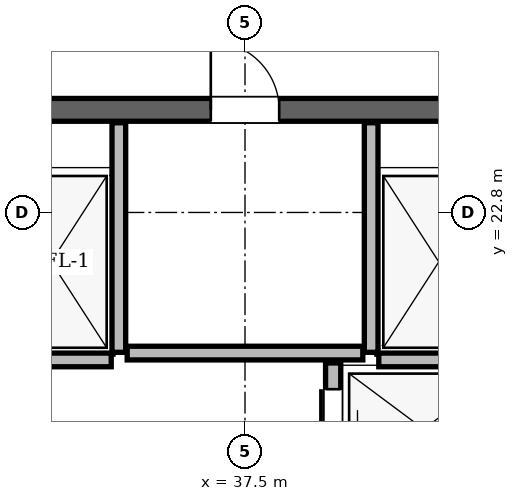
"""IFC4 building model, lengths in metres.
Left out: names, types, materials, properties, quantities, classifications, styles, units other than length and angle.
Written with IfcOpenShell. Run it as: python <this file> out.ifc"""

import sys

from ifc_helpers import new_model, si_unit, direction, frame, frame_2d, origin, place, context, subcontext, project, spatial, rectangle, extrude, element, fill, save


model = new_model("IFC4")
c1 = context("Model", 3, precision=1e-05, world=origin(), true_north=direction((0.0, 1.0)))
c2 = subcontext(c1, "Body", "Model", "MODEL_VIEW")
j1 = project(units=[si_unit("LENGTHUNIT", "METRE"), si_unit("PLANEANGLEUNIT", "RADIAN")], contexts=[c1])
p1 = place(None, origin())
s1 = spatial("IfcSite", under=j1, at=p1, CompositionType="ELEMENT")
p2 = place(p1, origin())
s2 = spatial("IfcBuilding", under=s1, at=p2, CompositionType="ELEMENT")
p3 = place(p2, frame((0.0, 0.0, 269.4)))
s3 = spatial("IfcBuildingStorey", under=s2, at=p3, CompositionType="ELEMENT", Elevation=269.4)
p4 = place(p3, frame((29.65, 24.15, 0.0), z_axis=(0.0, 0.0, 1.0), x_axis=(1.0, 0.0, 0.0)))
e1 = element("IfcWall", 1, at=p4, inside=s3, PredefinedType="SHEAR", context=c2, shape_type="SweptSolid", body=[
    extrude(rectangle(XDim=15.7, YDim=0.3, at=frame_2d((7.85, 0.0))), origin(), (0.0, 0.0, 1.0), 3.68),
])
p5 = place(p4, frame((1.7, 0.0, 0.0)))
e2 = element("IfcOpeningElement", 2, at=p5, cuts=e1, PredefinedType="OPENING", context=c2, shape_type="SweptSolid", body=[
    extrude(rectangle(XDim=1.2, YDim=2.2, at=frame_2d((0.6, 1.1))), frame((0.0, 0.15, 0.0), z_axis=(0.0, -1.0, 0.0), x_axis=(1.0, 0.0, 0.0)), (0.0, 0.0, 1.0), 0.3),
])
p6 = place(p4, frame((12.8, 0.0, 0.0)))
e3 = element("IfcOpeningElement", 3, at=p6, cuts=e1, PredefinedType="OPENING", context=c2, shape_type="SweptSolid", body=[
    extrude(rectangle(XDim=1.2, YDim=2.2, at=frame_2d((0.6, 1.1))), frame((0.0, 0.15, 0.0), z_axis=(0.0, -1.0, 0.0), x_axis=(1.0, 0.0, 0.0)), (0.0, 0.0, 1.0), 0.3),
])
p7 = place(p4, frame((7.4, 0.0, 0.0)))
e4 = element("IfcOpeningElement", 4, at=p7, cuts=e1, PredefinedType="OPENING", context=c2, shape_type="SweptSolid", body=[
    extrude(rectangle(XDim=0.9, YDim=2.05, at=frame_2d((0.45, 1.025))), frame((0.0, 0.15, 0.0), z_axis=(0.0, -1.0, 0.0), x_axis=(1.0, 0.0, 0.0)), (0.0, 0.0, 1.0), 0.3),
])
p8 = place(p3, frame((58.572, 10.733, 0.0), z_axis=(0.0, 0.0, 1.0), x_axis=(-0.500001430823, 0.866024577697, 0.0)))
e5 = element("IfcWall", 5, at=p8, inside=s3, PredefinedType="SOLIDWALL", context=c2, shape_type="SweptSolid", body=[
    extrude(rectangle(XDim=37.296, YDim=0.29, at=frame_2d((18.648, 0.0))), origin(), (0.0, 0.0, 1.0), 3.058),
])
p9 = place(p8, frame((8.454, 0.0, 0.0)))
e6 = element("IfcOpeningElement", 6, at=p9, cuts=e5, PredefinedType="OPENING", context=c2, shape_type="SweptSolid", body=[
    extrude(rectangle(XDim=1.5, YDim=2.2, at=frame_2d((0.75, 1.1))), frame((0.0, 0.145, 0.0), z_axis=(0.0, -1.0, 0.0), x_axis=(1.0, 0.0, 0.0)), (0.0, 0.0, 1.0), 0.29),
])
p10 = place(p8, frame((28.796, 0.0, 0.0)))
e7 = element("IfcOpeningElement", 7, at=p10, cuts=e5, PredefinedType="OPENING", context=c2, shape_type="SweptSolid", body=[
    extrude(rectangle(XDim=1.5, YDim=2.2, at=frame_2d((0.75, 1.1))), frame((0.0, 0.145, 0.0), z_axis=(0.0, -1.0, 0.0), x_axis=(1.0, 0.0, 0.0)), (0.0, 0.0, 1.0), 0.29),
])
p11 = place(p8, frame((0.77, 0.0, 0.85)))
e8 = element("IfcOpeningElement", 8, at=p11, cuts=e5, PredefinedType="OPENING", context=c2, shape_type="SweptSolid", body=[
    extrude(rectangle(XDim=1.2, YDim=1.48, at=frame_2d((0.6, 0.74))), frame((0.0, 0.145, 0.0), z_axis=(0.0, -1.0, 0.0), x_axis=(1.0, 0.0, 0.0)), (0.0, 0.0, 1.0), 0.29),
])
p12 = place(p8, frame((2.285, 0.0, 0.85)))
e9 = element("IfcOpeningElement", 9, at=p12, cuts=e5, PredefinedType="OPENING", context=c2, shape_type="SweptSolid", body=[
    extrude(rectangle(XDim=1.2, YDim=1.48, at=frame_2d((0.6, 0.74))), frame((0.0, 0.145, 0.0), z_axis=(0.0, -1.0, 0.0), x_axis=(1.0, 0.0, 0.0)), (0.0, 0.0, 1.0), 0.29),
])
p13 = place(p8, frame((6.772, 0.0, 0.85)))
e10 = element("IfcOpeningElement", 10, at=p13, cuts=e5, PredefinedType="OPENING", context=c2, shape_type="SweptSolid", body=[
    extrude(rectangle(XDim=1.2, YDim=1.48, at=frame_2d((0.6, 0.74))), frame((0.0, 0.145, 0.0), z_axis=(0.0, -1.0, 0.0), x_axis=(1.0, 0.0, 0.0)), (0.0, 0.0, 1.0), 0.29),
])
p14 = place(p8, frame((12.682, 0.0, 0.85)))
e11 = element("IfcOpeningElement", 11, at=p14, cuts=e5, PredefinedType="OPENING", context=c2, shape_type="SweptSolid", body=[
    extrude(rectangle(XDim=3.0, YDim=2.098, at=frame_2d((1.5, 1.049))), frame((0.0, 0.145, 0.0), z_axis=(0.0, -1.0, 0.0), x_axis=(1.0, 0.0, 0.0)), (0.0, 0.0, 1.0), 0.29),
])
p15 = place(p8, frame((17.842, 0.0, 0.85)))
e12 = element("IfcOpeningElement", 12, at=p15, cuts=e5, PredefinedType="OPENING", context=c2, shape_type="SweptSolid", body=[
    extrude(rectangle(XDim=2.6, YDim=1.95, at=frame_2d((1.3, 0.975))), frame((0.0, 0.145, 0.0), z_axis=(0.0, -1.0, 0.0), x_axis=(1.0, 0.0, 0.0)), (0.0, 0.0, 1.0), 0.29),
])
p16 = place(p8, frame((35.217, 0.0, 0.85)))
e13 = element("IfcOpeningElement", 13, at=p16, cuts=e5, PredefinedType="OPENING", context=c2, shape_type="SweptSolid", body=[
    extrude(rectangle(XDim=1.2, YDim=1.48, at=frame_2d((0.6, 0.74))), frame((0.0, 0.145, 0.0), z_axis=(0.0, -1.0, 0.0), x_axis=(1.0, 0.0, 0.0)), (0.0, 0.0, 1.0), 0.29),
])
p17 = place(p8, frame((33.737, 0.0, 0.85)))
e14 = element("IfcOpeningElement", 14, at=p17, cuts=e5, PredefinedType="OPENING", context=c2, shape_type="SweptSolid", body=[
    extrude(rectangle(XDim=1.2, YDim=1.48, at=frame_2d((0.6, 0.74))), frame((0.0, 0.145, 0.0), z_axis=(0.0, -1.0, 0.0), x_axis=(1.0, 0.0, 0.0)), (0.0, 0.0, 1.0), 0.29),
])
p18 = place(p8, frame((22.775, 0.0, 0.85)))
e15 = element("IfcOpeningElement", 15, at=p18, cuts=e5, PredefinedType="OPENING", context=c2, shape_type="SweptSolid", body=[
    extrude(rectangle(XDim=1.2, YDim=1.48, at=frame_2d((0.6, 0.74))), frame((0.0, 0.145, 0.0), z_axis=(0.0, -1.0, 0.0), x_axis=(1.0, 0.0, 0.0)), (0.0, 0.0, 1.0), 0.29),
])
p19 = place(p8, frame((31.663, 0.0, 0.85)))
e16 = element("IfcOpeningElement", 16, at=p19, cuts=e5, PredefinedType="OPENING", context=c2, shape_type="SweptSolid", body=[
    extrude(rectangle(XDim=1.2, YDim=1.48, at=frame_2d((0.6, 0.74))), frame((0.0, 0.145, 0.0), z_axis=(0.0, -1.0, 0.0), x_axis=(1.0, 0.0, 0.0)), (0.0, 0.0, 1.0), 0.29),
])
p20 = place(p3, frame((35.076, 43.032, 0.0), z_axis=(0.0, 0.0, 1.0), x_axis=(-0.500001430823, -0.866024577697, 0.0)))
e17 = element("IfcWall", 17, at=p20, inside=s3, PredefinedType="SOLIDWALL", context=c2, shape_type="SweptSolid", body=[
    extrude(rectangle(XDim=37.296, YDim=0.29, at=frame_2d((18.648, 0.0))), origin(), (0.0, 0.0, 1.0), 3.058),
])
p21 = place(p20, frame((8.244, 0.0, 0.0)))
e18 = element("IfcOpeningElement", 18, at=p21, cuts=e17, PredefinedType="OPENING", context=c2, shape_type="SweptSolid", body=[
    extrude(rectangle(XDim=1.5, YDim=2.2, at=frame_2d((0.75, 1.1))), frame((0.0, 0.145, 0.0), z_axis=(0.0, -1.0, 0.0), x_axis=(1.0, 0.0, 0.0)), (0.0, 0.0, 1.0), 0.29),
])
p22 = place(p20, frame((29.006, 0.0, 0.0)))
e19 = element("IfcOpeningElement", 19, at=p22, cuts=e17, PredefinedType="OPENING", context=c2, shape_type="SweptSolid", body=[
    extrude(rectangle(XDim=1.5, YDim=2.2, at=frame_2d((0.75, 1.1))), frame((0.0, 0.145, 0.0), z_axis=(0.0, -1.0, 0.0), x_axis=(1.0, 0.0, 0.0)), (0.0, 0.0, 1.0), 0.29),
])
p23 = place(p20, frame((22.292, 0.0, 0.85)))
e20 = element("IfcOpeningElement", 20, at=p23, cuts=e17, PredefinedType="OPENING", context=c2, shape_type="SweptSolid", body=[
    extrude(rectangle(XDim=2.6, YDim=1.95, at=frame_2d((1.3, 0.975))), frame((0.0, 0.145, 0.0), z_axis=(0.0, -1.0, 0.0), x_axis=(1.0, 0.0, 0.0)), (0.0, 0.0, 1.0), 0.29),
])
p24 = place(p20, frame((33.833, 0.0, 0.85)))
e21 = element("IfcOpeningElement", 21, at=p24, cuts=e17, PredefinedType="OPENING", context=c2, shape_type="SweptSolid", body=[
    extrude(rectangle(XDim=2.4, YDim=1.9, at=frame_2d((1.2, 0.95))), frame((0.0, 0.145, 0.0), z_axis=(0.0, -1.0, 0.0), x_axis=(1.0, 0.0, 0.0)), (0.0, 0.0, 1.0), 0.29),
])
p25 = place(p20, frame((12.154, 0.0, 0.85)))
e22 = element("IfcOpeningElement", 22, at=p25, cuts=e17, PredefinedType="OPENING", context=c2, shape_type="SweptSolid", body=[
    extrude(rectangle(XDim=1.2, YDim=1.48, at=frame_2d((0.6, 0.74))), frame((0.0, 0.145, 0.0), z_axis=(0.0, -1.0, 0.0), x_axis=(1.0, 0.0, 0.0)), (0.0, 0.0, 1.0), 0.29),
])
p26 = place(p20, frame((16.612, 0.0, 0.85)))
e23 = element("IfcOpeningElement", 23, at=p26, cuts=e17, PredefinedType="OPENING", context=c2, shape_type="SweptSolid", body=[
    extrude(rectangle(XDim=1.6, YDim=1.7, at=frame_2d((0.8, 0.85))), frame((0.0, 0.145, 0.0), z_axis=(0.0, -1.0, 0.0), x_axis=(1.0, 0.0, 0.0)), (0.0, 0.0, 1.0), 0.29),
])
p27 = place(p20, frame((2.665, 0.0, 0.85)))
e24 = element("IfcOpeningElement", 24, at=p27, cuts=e17, PredefinedType="OPENING", context=c2, shape_type="SweptSolid", body=[
    extrude(rectangle(XDim=2.0, YDim=1.8, at=frame_2d((1.0, 0.9))), frame((0.0, 0.145, 0.0), z_axis=(0.0, -1.0, 0.0), x_axis=(1.0, 0.0, 0.0)), (0.0, 0.0, 1.0), 0.29),
])
p28 = place(p3, frame((35.84, 20.96, 0.0), z_axis=(0.0, 0.0, 1.0), x_axis=(0.0, 1.0, 0.0)))
e25 = element("IfcWall", 25, at=p28, inside=s3, PredefinedType="PARTITIONING", context=c2, shape_type="SweptSolid", body=[
    extrude(rectangle(XDim=3.02, YDim=0.18, at=frame_2d((1.51, 0.0))), origin(), (0.0, 0.0, 1.0), 3.68),
])
p29 = place(p3, frame((34.16, 20.86, 0.0), z_axis=(0.0, 0.0, 1.0), x_axis=(1.0, 0.0, 0.0)))
e26 = element("IfcWall", 26, at=p29, inside=s3, PredefinedType="PARTITIONING", context=c2, shape_type="SweptSolid", body=[
    extrude(rectangle(XDim=1.58, YDim=0.18, at=frame_2d((0.79, 0.0))), origin(), (0.0, 0.0, 1.0), 3.68),
])
p30 = place(p3, frame((39.16, 20.96, 0.0), z_axis=(0.0, 0.0, 1.0), x_axis=(0.0, 1.0, 0.0)))
e27 = element("IfcWall", 27, at=p30, inside=s3, PredefinedType="PARTITIONING", context=c2, shape_type="SweptSolid", body=[
    extrude(rectangle(XDim=3.02, YDim=0.18, at=frame_2d((1.51, 0.0))), origin(), (0.0, 0.0, 1.0), 3.68),
])
p31 = place(p3, frame((39.26, 20.86, 0.0), z_axis=(0.0, 0.0, 1.0), x_axis=(1.0, 0.0, 0.0)))
e28 = element("IfcWall", 28, at=p31, inside=s3, PredefinedType="PARTITIONING", context=c2, shape_type="SweptSolid", body=[
    extrude(rectangle(XDim=1.58, YDim=0.18, at=frame_2d((0.79, 0.0))), origin(), (0.0, 0.0, 1.0), 3.68),
])
p32 = place(p3, frame((38.66, 17.2, 0.0), z_axis=(0.0, 0.0, 1.0), x_axis=(0.0, 1.0, 0.0)))
e29 = element("IfcWall", 29, at=p32, inside=s3, PredefinedType="PARTITIONING", context=c2, shape_type="SweptSolid", body=[
    extrude(rectangle(XDim=3.62, YDim=0.2, at=frame_2d((1.81, 0.0))), origin(), (0.0, 0.0, 1.0), 3.68),
])
p33 = place(p32, frame((0.425, 0.0, 0.0)))
e30 = element("IfcOpeningElement", 30, at=p33, cuts=e29, PredefinedType="OPENING", context=c2, shape_type="SweptSolid", body=[
    extrude(rectangle(XDim=1.05, YDim=2.15, at=frame_2d((0.525, 1.075))), frame((0.0, 0.1, 0.0), z_axis=(0.0, -1.0, 0.0), x_axis=(1.0, 0.0, 0.0)), (0.0, 0.0, 1.0), 0.2),
])
p34 = place(p32, frame((2.225, 0.0, 0.0)))
e31 = element("IfcOpeningElement", 31, at=p34, cuts=e29, PredefinedType="OPENING", context=c2, shape_type="SweptSolid", body=[
    extrude(rectangle(XDim=1.05, YDim=2.15, at=frame_2d((0.525, 1.075))), frame((0.0, 0.1, 0.0), z_axis=(0.0, -1.0, 0.0), x_axis=(1.0, 0.0, 0.0)), (0.0, 0.0, 1.0), 0.2),
])
p35 = place(p3, frame((35.95, 20.95, 0.0), z_axis=(0.0, 0.0, 1.0), x_axis=(1.0, 0.0, 0.0)))
e32 = element("IfcWall", 32, at=p35, inside=s3, PredefinedType="PARTITIONING", context=c2, shape_type="SweptSolid", body=[
    extrude(rectangle(XDim=3.1, YDim=0.18, at=frame_2d((1.55, 0.0))), origin(), (0.0, 0.0, 1.0), 3.68),
])
p36 = place(p34, origin())
e33 = element("IfcDoor", 33, at=p36, inside=s3, OperationType="SLIDING_TO_LEFT", PredefinedType="DOOR", context=c2, shape_type="SweptSolid", body=[
    extrude(rectangle(XDim=1.05, YDim=2.15, at=frame_2d((0.525, 1.075))), frame((0.0, 0.025, 0.0), z_axis=(0.0, -1.0, 0.0), x_axis=(1.0, 0.0, 0.0)), (0.0, 0.0, 1.0), 0.05),
])
fill(e31, e33)
p37 = place(p7, origin())
e34 = element("IfcDoor", 34, at=p37, inside=s3, OperationType="SINGLE_SWING_LEFT", PredefinedType="DOOR", context=c2, shape_type="SweptSolid", body=[
    extrude(rectangle(XDim=0.9, YDim=2.05, at=frame_2d((0.45, 1.025))), frame((0.0, 0.025, 0.0), z_axis=(0.0, -1.0, 0.0), x_axis=(1.0, 0.0, 0.0)), (0.0, 0.0, 1.0), 0.05),
])
fill(e4, e34)
save(model, sys.argv[1])
